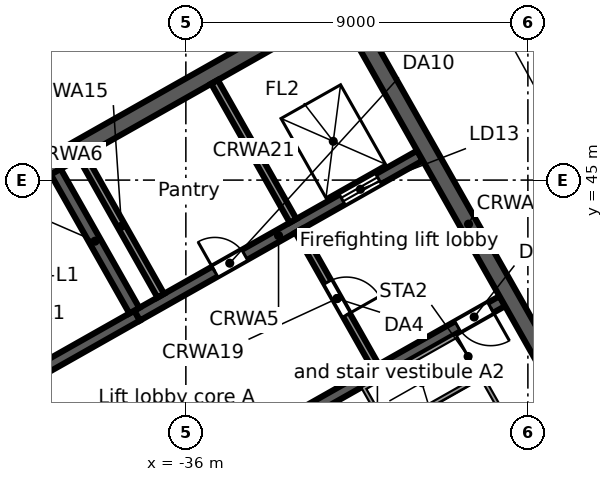
"""IFC4 building model, lengths in metres.
Left out: names, types, materials, properties, quantities, classifications, styles, units other than length and angle.
Written with IfcOpenShell. Run it as: python <this file> out.ifc"""

import sys

from ifc_helpers import new_model, si_unit, direction, frame, frame_2d, origin, place, context, subcontext, project, spatial, rectangle, extrude, element, fill, save


model = new_model("IFC4")
c1 = context("Model", 3, precision=1e-05, world=origin(), true_north=direction((0.0, 1.0)))
c2 = subcontext(c1, "Body", "Model", "MODEL_VIEW")
j1 = project(units=[si_unit("LENGTHUNIT", "METRE"), si_unit("PLANEANGLEUNIT", "RADIAN")], contexts=[c1])
p1 = place(None, origin())
s1 = spatial("IfcSite", under=j1, at=p1, CompositionType="ELEMENT")
p2 = place(p1, origin())
s2 = spatial("IfcBuilding", under=s1, at=p2, CompositionType="ELEMENT")
p3 = place(p2, frame((0.0, 0.0, 250.4)))
s3 = spatial("IfcBuildingStorey", under=s2, at=p3, CompositionType="ELEMENT", Elevation=250.4)
p4 = place(p3, frame((-0.046, 47.974, 0.0), z_axis=(0.0, 0.0, 1.0), x_axis=(-0.870356579543, -0.492421998337, 0.0)))
e1 = element("IfcWall", 1, at=p4, inside=s3, PredefinedType="STANDARD", context=c2, shape_type="SweptSolid", body=[
    extrude(rectangle(XDim=43.754, YDim=0.25, at=frame_2d((21.877, 0.0))), origin(), (0.0, 0.0, 1.0), 3.62),
])
p5 = place(p4, frame((41.061, 0.0, 0.8)))
e2 = element("IfcOpeningElement", 2, at=p5, cuts=e1, PredefinedType="OPENING", context=c2, shape_type="SweptSolid", body=[
    extrude(rectangle(XDim=2.4, YDim=2.2, at=frame_2d((1.2, 1.1))), frame((0.0, 0.135, 0.0), z_axis=(0.0, -1.0, 0.0), x_axis=(1.0, 0.0, 0.0)), (0.0, 0.0, 1.0), 0.27),
])
p6 = place(p4, frame((38.443, 0.0, 0.0)))
e3 = element("IfcOpeningElement", 3, at=p6, cuts=e1, PredefinedType="OPENING", context=c2, shape_type="SweptSolid", body=[
    extrude(rectangle(XDim=1.8, YDim=2.4, at=frame_2d((0.9, 1.2))), frame((0.0, 0.135, 0.0), z_axis=(0.0, -1.0, 0.0), x_axis=(1.0, 0.0, 0.0)), (0.0, 0.0, 1.0), 0.27),
])
p7 = place(p4, frame((35.225, 0.0, 0.8)))
e4 = element("IfcOpeningElement", 4, at=p7, cuts=e1, PredefinedType="OPENING", context=c2, shape_type="SweptSolid", body=[
    extrude(rectangle(XDim=2.4, YDim=2.2, at=frame_2d((1.2, 1.1))), frame((0.0, 0.135, 0.0), z_axis=(0.0, -1.0, 0.0), x_axis=(1.0, 0.0, 0.0)), (0.0, 0.0, 1.0), 0.27),
])
p8 = place(p4, frame((32.307, 0.0, 0.8)))
e5 = element("IfcOpeningElement", 5, at=p8, cuts=e1, PredefinedType="OPENING", context=c2, shape_type="SweptSolid", body=[
    extrude(rectangle(XDim=2.4, YDim=2.2, at=frame_2d((1.2, 1.1))), frame((0.0, 0.135, 0.0), z_axis=(0.0, -1.0, 0.0), x_axis=(1.0, 0.0, 0.0)), (0.0, 0.0, 1.0), 0.27),
])
p9 = place(p4, frame((29.688, 0.0, 0.0)))
e6 = element("IfcOpeningElement", 6, at=p9, cuts=e1, PredefinedType="OPENING", context=c2, shape_type="SweptSolid", body=[
    extrude(rectangle(XDim=1.8, YDim=2.4, at=frame_2d((0.9, 1.2))), frame((0.0, 0.135, 0.0), z_axis=(0.0, -1.0, 0.0), x_axis=(1.0, 0.0, 0.0)), (0.0, 0.0, 1.0), 0.27),
])
p10 = place(p4, frame((26.47, 0.0, 0.8)))
e7 = element("IfcOpeningElement", 7, at=p10, cuts=e1, PredefinedType="OPENING", context=c2, shape_type="SweptSolid", body=[
    extrude(rectangle(XDim=2.4, YDim=2.2, at=frame_2d((1.2, 1.1))), frame((0.0, 0.135, 0.0), z_axis=(0.0, -1.0, 0.0), x_axis=(1.0, 0.0, 0.0)), (0.0, 0.0, 1.0), 0.27),
])
p11 = place(p4, frame((23.552, 0.0, 0.8)))
e8 = element("IfcOpeningElement", 8, at=p11, cuts=e1, PredefinedType="OPENING", context=c2, shape_type="SweptSolid", body=[
    extrude(rectangle(XDim=2.4, YDim=2.2, at=frame_2d((1.2, 1.1))), frame((0.0, 0.135, 0.0), z_axis=(0.0, -1.0, 0.0), x_axis=(1.0, 0.0, 0.0)), (0.0, 0.0, 1.0), 0.27),
])
p12 = place(p4, frame((20.934, 0.0, 0.0)))
e9 = element("IfcOpeningElement", 9, at=p12, cuts=e1, PredefinedType="OPENING", context=c2, shape_type="SweptSolid", body=[
    extrude(rectangle(XDim=1.8, YDim=2.4, at=frame_2d((0.9, 1.2))), frame((0.0, 0.135, 0.0), z_axis=(0.0, -1.0, 0.0), x_axis=(1.0, 0.0, 0.0)), (0.0, 0.0, 1.0), 0.27),
])
p13 = place(p4, frame((17.716, 0.0, 0.8)))
e10 = element("IfcOpeningElement", 10, at=p13, cuts=e1, PredefinedType="OPENING", context=c2, shape_type="SweptSolid", body=[
    extrude(rectangle(XDim=2.4, YDim=2.2, at=frame_2d((1.2, 1.1))), frame((0.0, 0.135, 0.0), z_axis=(0.0, -1.0, 0.0), x_axis=(1.0, 0.0, 0.0)), (0.0, 0.0, 1.0), 0.27),
])
p14 = place(p4, frame((14.798, 0.0, 0.8)))
e11 = element("IfcOpeningElement", 11, at=p14, cuts=e1, PredefinedType="OPENING", context=c2, shape_type="SweptSolid", body=[
    extrude(rectangle(XDim=2.4, YDim=2.2, at=frame_2d((1.2, 1.1))), frame((0.0, 0.135, 0.0), z_axis=(0.0, -1.0, 0.0), x_axis=(1.0, 0.0, 0.0)), (0.0, 0.0, 1.0), 0.27),
])
p15 = place(p4, frame((12.179, 0.0, 0.0)))
e12 = element("IfcOpeningElement", 12, at=p15, cuts=e1, PredefinedType="OPENING", context=c2, shape_type="SweptSolid", body=[
    extrude(rectangle(XDim=1.8, YDim=2.4, at=frame_2d((0.9, 1.2))), frame((0.0, 0.135, 0.0), z_axis=(0.0, -1.0, 0.0), x_axis=(1.0, 0.0, 0.0)), (0.0, 0.0, 1.0), 0.27),
])
p16 = place(p4, frame((8.961, 0.0, 0.8)))
e13 = element("IfcOpeningElement", 13, at=p16, cuts=e1, PredefinedType="OPENING", context=c2, shape_type="SweptSolid", body=[
    extrude(rectangle(XDim=2.4, YDim=2.2, at=frame_2d((1.2, 1.1))), frame((0.0, 0.135, 0.0), z_axis=(0.0, -1.0, 0.0), x_axis=(1.0, 0.0, 0.0)), (0.0, 0.0, 1.0), 0.27),
])
p17 = place(p4, frame((6.043, 0.0, 0.8)))
e14 = element("IfcOpeningElement", 14, at=p17, cuts=e1, PredefinedType="OPENING", context=c2, shape_type="SweptSolid", body=[
    extrude(rectangle(XDim=2.4, YDim=2.2, at=frame_2d((1.2, 1.1))), frame((0.0, 0.135, 0.0), z_axis=(0.0, -1.0, 0.0), x_axis=(1.0, 0.0, 0.0)), (0.0, 0.0, 1.0), 0.27),
])
p18 = place(p4, frame((3.425, 0.0, 0.0)))
e15 = element("IfcOpeningElement", 15, at=p18, cuts=e1, PredefinedType="OPENING", context=c2, shape_type="SweptSolid", body=[
    extrude(rectangle(XDim=1.8, YDim=2.4, at=frame_2d((0.9, 1.2))), frame((0.0, 0.135, 0.0), z_axis=(0.0, -1.0, 0.0), x_axis=(1.0, 0.0, 0.0)), (0.0, 0.0, 1.0), 0.27),
])
p19 = place(p4, frame((0.207, 0.0, 0.8)))
e16 = element("IfcOpeningElement", 16, at=p19, cuts=e1, PredefinedType="OPENING", context=c2, shape_type="SweptSolid", body=[
    extrude(rectangle(XDim=2.4, YDim=2.2, at=frame_2d((1.2, 1.1))), frame((0.0, 0.135, 0.0), z_axis=(0.0, -1.0, 0.0), x_axis=(1.0, 0.0, 0.0)), (0.0, 0.0, 1.0), 0.27),
])
p20 = place(p3, frame((-58.732, 38.771, 0.0), z_axis=(0.0, 0.0, 1.0), x_axis=(0.870354824205, 0.492425100887, 0.0)))
e17 = element("IfcWall", 17, at=p20, inside=s3, PredefinedType="STANDARD", context=c2, shape_type="SweptSolid", body=[
    extrude(rectangle(XDim=64.006, YDim=0.25, at=frame_2d((32.003, 0.0))), origin(), (0.0, 0.0, 1.0), 3.62),
])
p21 = place(p20, frame((61.259, 0.0, 0.8)))
e18 = element("IfcOpeningElement", 18, at=p21, cuts=e17, PredefinedType="OPENING", context=c2, shape_type="SweptSolid", body=[
    extrude(rectangle(XDim=2.4, YDim=2.2, at=frame_2d((1.2, 1.1))), frame((0.0, 0.135, 0.0), z_axis=(0.0, -1.0, 0.0), x_axis=(1.0, 0.0, 0.0)), (0.0, 0.0, 1.0), 0.27),
])
p22 = place(p20, frame((58.216, 0.0, 0.8)))
e19 = element("IfcOpeningElement", 19, at=p22, cuts=e17, PredefinedType="OPENING", context=c2, shape_type="SweptSolid", body=[
    extrude(rectangle(XDim=2.4, YDim=2.2, at=frame_2d((1.2, 1.1))), frame((0.0, 0.135, 0.0), z_axis=(0.0, -1.0, 0.0), x_axis=(1.0, 0.0, 0.0)), (0.0, 0.0, 1.0), 0.27),
])
p23 = place(p20, frame((55.173, 0.0, 0.8)))
e20 = element("IfcOpeningElement", 20, at=p23, cuts=e17, PredefinedType="OPENING", context=c2, shape_type="SweptSolid", body=[
    extrude(rectangle(XDim=2.4, YDim=2.2, at=frame_2d((1.2, 1.1))), frame((0.0, 0.135, 0.0), z_axis=(0.0, -1.0, 0.0), x_axis=(1.0, 0.0, 0.0)), (0.0, 0.0, 1.0), 0.27),
])
p24 = place(p20, frame((52.129, 0.0, 0.8)))
e21 = element("IfcOpeningElement", 21, at=p24, cuts=e17, PredefinedType="OPENING", context=c2, shape_type="SweptSolid", body=[
    extrude(rectangle(XDim=2.4, YDim=2.2, at=frame_2d((1.2, 1.1))), frame((0.0, 0.135, 0.0), z_axis=(0.0, -1.0, 0.0), x_axis=(1.0, 0.0, 0.0)), (0.0, 0.0, 1.0), 0.27),
])
p25 = place(p20, frame((49.086, 0.0, 0.8)))
e22 = element("IfcOpeningElement", 22, at=p25, cuts=e17, PredefinedType="OPENING", context=c2, shape_type="SweptSolid", body=[
    extrude(rectangle(XDim=2.4, YDim=2.2, at=frame_2d((1.2, 1.1))), frame((0.0, 0.135, 0.0), z_axis=(0.0, -1.0, 0.0), x_axis=(1.0, 0.0, 0.0)), (0.0, 0.0, 1.0), 0.27),
])
p26 = place(p20, frame((46.043, 0.0, 0.8)))
e23 = element("IfcOpeningElement", 23, at=p26, cuts=e17, PredefinedType="OPENING", context=c2, shape_type="SweptSolid", body=[
    extrude(rectangle(XDim=2.4, YDim=2.2, at=frame_2d((1.2, 1.1))), frame((0.0, 0.135, 0.0), z_axis=(0.0, -1.0, 0.0), x_axis=(1.0, 0.0, 0.0)), (0.0, 0.0, 1.0), 0.27),
])
p27 = place(p20, frame((43.0, 0.0, 0.8)))
e24 = element("IfcOpeningElement", 24, at=p27, cuts=e17, PredefinedType="OPENING", context=c2, shape_type="SweptSolid", body=[
    extrude(rectangle(XDim=2.4, YDim=2.2, at=frame_2d((1.2, 1.1))), frame((0.0, 0.135, 0.0), z_axis=(0.0, -1.0, 0.0), x_axis=(1.0, 0.0, 0.0)), (0.0, 0.0, 1.0), 0.27),
])
p28 = place(p20, frame((39.956, 0.0, 0.8)))
e25 = element("IfcOpeningElement", 25, at=p28, cuts=e17, PredefinedType="OPENING", context=c2, shape_type="SweptSolid", body=[
    extrude(rectangle(XDim=2.4, YDim=2.2, at=frame_2d((1.2, 1.1))), frame((0.0, 0.135, 0.0), z_axis=(0.0, -1.0, 0.0), x_axis=(1.0, 0.0, 0.0)), (0.0, 0.0, 1.0), 0.27),
])
p29 = place(p20, frame((36.913, 0.0, 0.8)))
e26 = element("IfcOpeningElement", 26, at=p29, cuts=e17, PredefinedType="OPENING", context=c2, shape_type="SweptSolid", body=[
    extrude(rectangle(XDim=2.4, YDim=2.2, at=frame_2d((1.2, 1.1))), frame((0.0, 0.135, 0.0), z_axis=(0.0, -1.0, 0.0), x_axis=(1.0, 0.0, 0.0)), (0.0, 0.0, 1.0), 0.27),
])
p30 = place(p20, frame((33.87, 0.0, 0.8)))
e27 = element("IfcOpeningElement", 27, at=p30, cuts=e17, PredefinedType="OPENING", context=c2, shape_type="SweptSolid", body=[
    extrude(rectangle(XDim=2.4, YDim=2.2, at=frame_2d((1.2, 1.1))), frame((0.0, 0.135, 0.0), z_axis=(0.0, -1.0, 0.0), x_axis=(1.0, 0.0, 0.0)), (0.0, 0.0, 1.0), 0.27),
])
p31 = place(p20, frame((30.826, 0.0, 0.8)))
e28 = element("IfcOpeningElement", 28, at=p31, cuts=e17, PredefinedType="OPENING", context=c2, shape_type="SweptSolid", body=[
    extrude(rectangle(XDim=2.4, YDim=2.2, at=frame_2d((1.2, 1.1))), frame((0.0, 0.135, 0.0), z_axis=(0.0, -1.0, 0.0), x_axis=(1.0, 0.0, 0.0)), (0.0, 0.0, 1.0), 0.27),
])
p32 = place(p20, frame((27.783, 0.0, 0.8)))
e29 = element("IfcOpeningElement", 29, at=p32, cuts=e17, PredefinedType="OPENING", context=c2, shape_type="SweptSolid", body=[
    extrude(rectangle(XDim=2.4, YDim=2.2, at=frame_2d((1.2, 1.1))), frame((0.0, 0.135, 0.0), z_axis=(0.0, -1.0, 0.0), x_axis=(1.0, 0.0, 0.0)), (0.0, 0.0, 1.0), 0.27),
])
p33 = place(p20, frame((24.74, 0.0, 0.8)))
e30 = element("IfcOpeningElement", 30, at=p33, cuts=e17, PredefinedType="OPENING", context=c2, shape_type="SweptSolid", body=[
    extrude(rectangle(XDim=2.4, YDim=2.2, at=frame_2d((1.2, 1.1))), frame((0.0, 0.135, 0.0), z_axis=(0.0, -1.0, 0.0), x_axis=(1.0, 0.0, 0.0)), (0.0, 0.0, 1.0), 0.27),
])
p34 = place(p20, frame((21.696, 0.0, 0.8)))
e31 = element("IfcOpeningElement", 31, at=p34, cuts=e17, PredefinedType="OPENING", context=c2, shape_type="SweptSolid", body=[
    extrude(rectangle(XDim=2.4, YDim=2.2, at=frame_2d((1.2, 1.1))), frame((0.0, 0.135, 0.0), z_axis=(0.0, -1.0, 0.0), x_axis=(1.0, 0.0, 0.0)), (0.0, 0.0, 1.0), 0.27),
])
p35 = place(p20, frame((18.653, 0.0, 0.8)))
e32 = element("IfcOpeningElement", 32, at=p35, cuts=e17, PredefinedType="OPENING", context=c2, shape_type="SweptSolid", body=[
    extrude(rectangle(XDim=2.4, YDim=2.2, at=frame_2d((1.2, 1.1))), frame((0.0, 0.135, 0.0), z_axis=(0.0, -1.0, 0.0), x_axis=(1.0, 0.0, 0.0)), (0.0, 0.0, 1.0), 0.27),
])
p36 = place(p20, frame((15.61, 0.0, 0.8)))
e33 = element("IfcOpeningElement", 33, at=p36, cuts=e17, PredefinedType="OPENING", context=c2, shape_type="SweptSolid", body=[
    extrude(rectangle(XDim=2.4, YDim=2.2, at=frame_2d((1.2, 1.1))), frame((0.0, 0.135, 0.0), z_axis=(0.0, -1.0, 0.0), x_axis=(1.0, 0.0, 0.0)), (0.0, 0.0, 1.0), 0.27),
])
p37 = place(p20, frame((12.567, 0.0, 0.8)))
e34 = element("IfcOpeningElement", 34, at=p37, cuts=e17, PredefinedType="OPENING", context=c2, shape_type="SweptSolid", body=[
    extrude(rectangle(XDim=2.4, YDim=2.2, at=frame_2d((1.2, 1.1))), frame((0.0, 0.135, 0.0), z_axis=(0.0, -1.0, 0.0), x_axis=(1.0, 0.0, 0.0)), (0.0, 0.0, 1.0), 0.27),
])
p38 = place(p20, frame((9.523, 0.0, 0.8)))
e35 = element("IfcOpeningElement", 35, at=p38, cuts=e17, PredefinedType="OPENING", context=c2, shape_type="SweptSolid", body=[
    extrude(rectangle(XDim=2.4, YDim=2.2, at=frame_2d((1.2, 1.1))), frame((0.0, 0.135, 0.0), z_axis=(0.0, -1.0, 0.0), x_axis=(1.0, 0.0, 0.0)), (0.0, 0.0, 1.0), 0.27),
])
p39 = place(p20, frame((6.48, 0.0, 0.8)))
e36 = element("IfcOpeningElement", 36, at=p39, cuts=e17, PredefinedType="OPENING", context=c2, shape_type="SweptSolid", body=[
    extrude(rectangle(XDim=2.4, YDim=2.2, at=frame_2d((1.2, 1.1))), frame((0.0, 0.135, 0.0), z_axis=(0.0, -1.0, 0.0), x_axis=(1.0, 0.0, 0.0)), (0.0, 0.0, 1.0), 0.27),
])
p40 = place(p20, frame((3.437, 0.0, 0.8)))
e37 = element("IfcOpeningElement", 37, at=p40, cuts=e17, PredefinedType="OPENING", context=c2, shape_type="SweptSolid", body=[
    extrude(rectangle(XDim=2.4, YDim=2.2, at=frame_2d((1.2, 1.1))), frame((0.0, 0.135, 0.0), z_axis=(0.0, -1.0, 0.0), x_axis=(1.0, 0.0, 0.0)), (0.0, 0.0, 1.0), 0.27),
])
p41 = place(p20, frame((0.393, 0.0, 0.8)))
e38 = element("IfcOpeningElement", 38, at=p41, cuts=e17, PredefinedType="OPENING", context=c2, shape_type="SweptSolid", body=[
    extrude(rectangle(XDim=2.4, YDim=2.2, at=frame_2d((1.2, 1.1))), frame((0.0, 0.135, 0.0), z_axis=(0.0, -1.0, 0.0), x_axis=(1.0, 0.0, 0.0)), (0.0, 0.0, 1.0), 0.27),
])
p42 = place(p3, frame((-34.245, 38.097, 0.0), z_axis=(0.0, 0.0, 1.0), x_axis=(0.870360409231, 0.492415229297, 0.0)))
e39 = element("IfcWall", 39, at=p42, inside=s3, PredefinedType="SOLIDWALL", context=c2, shape_type="SweptSolid", body=[
    extrude(rectangle(XDim=7.55, YDim=0.3, at=frame_2d((3.775, 0.0))), origin(), (0.0, 0.0, 1.0), 3.62),
])
p43 = place(p42, frame((6.2, 0.0, 0.0)))
e40 = element("IfcOpeningElement", 40, at=p43, cuts=e39, PredefinedType="OPENING", context=c2, shape_type="SweptSolid", body=[
    extrude(rectangle(XDim=1.0, YDim=2.1, at=frame_2d((0.5, 1.05))), frame((0.0, 0.16, 0.0), z_axis=(0.0, -1.0, 0.0), x_axis=(1.0, 0.0, 0.0)), (0.0, 0.0, 1.0), 0.32),
])
p44 = place(p3, frame((-43.853, 37.717, 0.0), z_axis=(0.0, 0.0, 1.0), x_axis=(0.870360409231, 0.492415229297, 0.0)))
e41 = element("IfcWall", 41, at=p44, inside=s3, PredefinedType="SOLIDWALL", context=c2, shape_type="SweptSolid", body=[
    extrude(rectangle(XDim=7.55, YDim=0.3, at=frame_2d((3.775, 0.0))), origin(), (0.0, 0.0, 1.0), 3.62),
])
p45 = place(p44, frame((0.35, 0.0, 0.0)))
e42 = element("IfcOpeningElement", 42, at=p45, cuts=e41, PredefinedType="OPENING", context=c2, shape_type="SweptSolid", body=[
    extrude(rectangle(XDim=1.0, YDim=2.1, at=frame_2d((0.5, 1.05))), frame((0.0, 0.16, 0.0), z_axis=(0.0, -1.0, 0.0), x_axis=(1.0, 0.0, 0.0)), (0.0, 0.0, 1.0), 0.32),
])
p46 = place(p3, frame((-37.282, 41.435, 0.0), z_axis=(0.0, 0.0, 1.0), x_axis=(0.870352688754, 0.492428875248, 0.0)))
e43 = element("IfcWall", 43, at=p46, inside=s3, PredefinedType="SOLIDWALL", context=c2, shape_type="SweptSolid", body=[
    extrude(rectangle(XDim=8.55, YDim=0.3, at=frame_2d((4.275, 0.0))), origin(), (0.0, 0.0, 1.0), 3.62),
])
p47 = place(p46, frame((6.2, 0.0, 0.0)))
e44 = element("IfcOpeningElement", 44, at=p47, cuts=e43, PredefinedType="OPENING", context=c2, shape_type="SweptSolid", body=[
    extrude(rectangle(XDim=1.1, YDim=2.1, at=frame_2d((0.55, 1.05))), frame((0.0, 0.16, 0.0), z_axis=(0.0, -1.0, 0.0), x_axis=(1.0, 0.0, 0.0)), (0.0, 0.0, 1.0), 0.32),
])
p48 = place(p46, frame((2.35, 0.0, 0.0)))
e45 = element("IfcOpeningElement", 45, at=p48, cuts=e43, PredefinedType="OPENING", context=c2, shape_type="SweptSolid", body=[
    extrude(rectangle(XDim=0.9, YDim=2.1, at=frame_2d((0.45, 1.05))), frame((0.0, 0.16, 0.0), z_axis=(0.0, -1.0, 0.0), x_axis=(1.0, 0.0, 0.0)), (0.0, 0.0, 1.0), 0.32),
])
p49 = place(p3, frame((-46.498, 41.477, 0.0), z_axis=(0.0, 0.0, 1.0), x_axis=(0.870359753402, 0.492416388494, 0.0)))
e46 = element("IfcWall", 46, at=p49, inside=s3, PredefinedType="SOLIDWALL", context=c2, shape_type="SweptSolid", body=[
    extrude(rectangle(XDim=17.0, YDim=0.45, at=frame_2d((8.5, 0.0))), origin(), (0.0, 0.0, 1.0), 3.62),
])
p50 = place(p3, frame((-40.516, 39.433, 0.0), z_axis=(0.0, 0.0, 1.0), x_axis=(0.492453559952, -0.87033872216, 0.0)))
e47 = element("IfcWall", 47, at=p50, inside=s3, PredefinedType="PARTITIONING", context=c2, shape_type="SweptSolid", body=[
    extrude(rectangle(XDim=4.1, YDim=0.2, at=frame_2d((2.05, 0.0))), origin(), (0.0, 0.0, 1.0), 3.62),
])
p51 = place(p50, frame((1.55, 0.0, 0.0)))
e48 = element("IfcOpeningElement", 48, at=p51, cuts=e47, PredefinedType="OPENING", context=c2, shape_type="SweptSolid", body=[
    extrude(rectangle(XDim=1.0, YDim=2.1, at=frame_2d((0.5, 1.05))), frame((0.0, 0.11, 0.0), z_axis=(0.0, -1.0, 0.0), x_axis=(1.0, 0.0, 0.0)), (0.0, 0.0, 1.0), 0.22),
])
p52 = place(p3, frame((-39.424, 45.22, 0.0), z_axis=(0.0, 0.0, 1.0), x_axis=(0.492409653846, -0.870363563575, 0.0)))
e49 = element("IfcWall", 49, at=p52, inside=s3, PredefinedType="SOLIDWALL", context=c2, shape_type="SweptSolid", body=[
    extrude(rectangle(XDim=4.2, YDim=0.3, at=frame_2d((2.1, 0.0))), origin(), (0.0, 0.0, 1.0), 3.62),
])
p53 = place(p3, frame((-38.728, 45.615, 0.0), z_axis=(0.0, 0.0, 1.0), x_axis=(0.492409653846, -0.870363563575, 0.0)))
e50 = element("IfcWall", 50, at=p53, inside=s3, PredefinedType="SOLIDWALL", context=c2, shape_type="SweptSolid", body=[
    extrude(rectangle(XDim=4.2, YDim=0.2, at=frame_2d((2.1, 0.0))), origin(), (0.0, 0.0, 1.0), 3.62),
])
p54 = place(p3, frame((-33.031, 43.667, 0.0), z_axis=(0.0, 0.0, 1.0), x_axis=(0.492408451753, -0.87036424366, 0.0)))
e51 = element("IfcWall", 51, at=p54, inside=s3, PredefinedType="PARTITIONING", context=c2, shape_type="SweptSolid", body=[
    extrude(rectangle(XDim=4.1, YDim=0.2, at=frame_2d((2.05, 0.0))), origin(), (0.0, 0.0, 1.0), 3.62),
])
p55 = place(p54, frame((1.55, 0.0, 0.0)))
e52 = element("IfcOpeningElement", 52, at=p55, cuts=e51, PredefinedType="OPENING", context=c2, shape_type="SweptSolid", body=[
    extrude(rectangle(XDim=1.0, YDim=2.1, at=frame_2d((0.5, 1.05))), frame((0.0, 0.11, 0.0), z_axis=(0.0, -1.0, 0.0), x_axis=(1.0, 0.0, 0.0)), (0.0, 0.0, 1.0), 0.22),
])
p56 = place(p3, frame((-35.246, 47.584, 0.0), z_axis=(0.0, 0.0, 1.0), x_axis=(0.492409653846, -0.870363563575, 0.0)))
e53 = element("IfcWall", 53, at=p56, inside=s3, PredefinedType="SOLIDWALL", context=c2, shape_type="SweptSolid", body=[
    extrude(rectangle(XDim=4.2, YDim=0.2, at=frame_2d((2.1, 0.0))), origin(), (0.0, 0.0, 1.0), 3.62),
])
p57 = place(p3, frame((-31.787, 49.542, 0.0), z_axis=(0.0, 0.0, 1.0), x_axis=(0.492421378713, -0.870356930107, 0.0)))
e54 = element("IfcWall", 54, at=p57, inside=s3, PredefinedType="SOLIDWALL", context=c2, shape_type="SweptSolid", body=[
    extrude(rectangle(XDim=13.1, YDim=0.45, at=frame_2d((6.55, 0.0))), origin(), (0.0, 0.0, 1.0), 3.62),
])
p58 = place(p47, origin())
e55 = element("IfcDoor", 55, at=p58, inside=s3, OperationType="DOUBLE_DOOR_SLIDING", PredefinedType="DOOR", context=c2, shape_type="SweptSolid", body=[
    extrude(rectangle(XDim=1.1, YDim=2.1, at=frame_2d((0.55, 1.05))), frame((0.0, 0.025, 0.0), z_axis=(0.0, -1.0, 0.0), x_axis=(1.0, 0.0, 0.0)), (0.0, 0.0, 1.0), 0.05),
])
fill(e44, e55)
p59 = place(p43, frame((1.0, 0.0, 0.0), z_axis=(0.0, 0.0, 1.0), x_axis=(-1.0, 0.0, 0.0)))
e56 = element("IfcDoor", 56, at=p59, inside=s3, OperationType="SINGLE_SWING_LEFT", PredefinedType="DOOR", context=c2, shape_type="SweptSolid", body=[
    extrude(rectangle(XDim=1.0, YDim=2.1, at=frame_2d((0.5, 1.05))), frame((0.0, 0.025, 0.0), z_axis=(0.0, -1.0, 0.0), x_axis=(1.0, 0.0, 0.0)), (0.0, 0.0, 1.0), 0.05),
])
fill(e40, e56)
p60 = place(p55, origin())
e57 = element("IfcDoor", 57, at=p60, inside=s3, OperationType="SINGLE_SWING_RIGHT", PredefinedType="DOOR", context=c2, shape_type="SweptSolid", body=[
    extrude(rectangle(XDim=1.0, YDim=2.1, at=frame_2d((0.5, 1.05))), frame((0.0, 0.025, 0.0), z_axis=(0.0, -1.0, 0.0), x_axis=(1.0, 0.0, 0.0)), (0.0, 0.0, 1.0), 0.05),
])
fill(e52, e57)
p61 = place(p48, origin())
e58 = element("IfcDoor", 58, at=p61, inside=s3, OperationType="SINGLE_SWING_LEFT", PredefinedType="DOOR", context=c2, shape_type="SweptSolid", body=[
    extrude(rectangle(XDim=0.9, YDim=2.1, at=frame_2d((0.45, 1.05))), frame((0.0, 0.025, 0.0), z_axis=(0.0, -1.0, 0.0), x_axis=(1.0, 0.0, 0.0)), (0.0, 0.0, 1.0), 0.05),
])
fill(e45, e58)
save(model, sys.argv[1])
